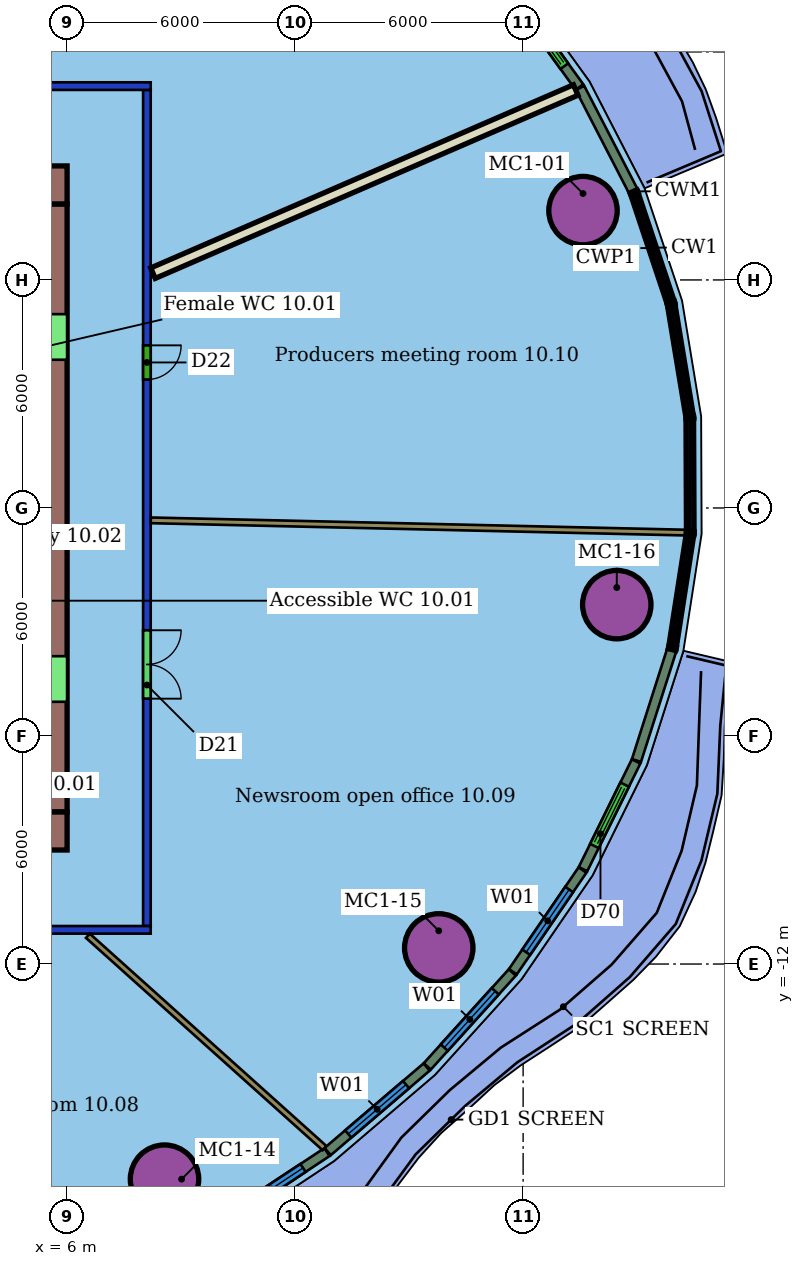
"""IFC4 building model, lengths in metres.
Left out: names, types, materials, properties, quantities, classifications, styles, units other than length and angle.
Written with IfcOpenShell. Run it as: python <this file> out.ifc"""

import sys

from ifc_helpers import new_model, si_unit, direction, frame, frame_2d, origin, origin_2d, place, context, subcontext, project, spatial, rectangle, hollow_circle, extrude, element, fill, save


model = new_model("IFC4")
c1 = context("Model", 3, precision=1e-05, world=origin(), true_north=direction((0.0, 1.0)))
c2 = subcontext(c1, "Body", "Model", "MODEL_VIEW")
j1 = project(units=[si_unit("LENGTHUNIT", "METRE"), si_unit("PLANEANGLEUNIT", "RADIAN")], contexts=[c1])
p1 = place(None, origin())
s1 = spatial("IfcSite", under=j1, at=p1, CompositionType="ELEMENT")
p2 = place(p1, origin())
s2 = spatial("IfcBuilding", under=s1, at=p2, CompositionType="ELEMENT")
p3 = place(p2, frame((0.0, 0.0, 54.5)))
s3 = spatial("IfcBuildingStorey", under=s2, at=p3, CompositionType="ELEMENT", Elevation=54.5)
for number, where, z_axis, x_axis in (
    (1, (19.575, 7.824, 0.0), (0.0, 0.0, 1.0), (1.0, 0.0, 0.0)),
    (2, (8.563, -17.66, 0.0), (0.0, 0.0, 1.0), (1.0, 0.0, 0.0)),
    (3, (15.78, -11.576, 0.0), (0.0, 0.0, 1.0), (1.0, 0.0, 0.0)),
    (4, (20.464, -2.543, 0.0), (0.0, 0.0, 1.0), (1.0, 0.0, 0.0)),
):
    element("IfcColumn", number, at=place(p3, frame(where, z_axis=z_axis, x_axis=x_axis)), inside=s3, PredefinedType="COLUMN", context=c2, shape_type="SweptSolid", body=[
        extrude(hollow_circle(Radius=0.9, WallThickness=0.06, at=origin_2d()), origin(), (0.0, 0.0, 1.0), 3.55),
    ])
p4 = place(p3, frame((8.2, -11.1, 0.0), z_axis=(0.0, 0.0, 1.0), x_axis=(-1.0, 0.0, 0.0)))
e5 = element("IfcWall", 5, at=p4, inside=s3, PredefinedType="PARTITIONING", context=c2, shape_type="SweptSolid", body=[
    extrude(rectangle(XDim=28.4, YDim=0.2, at=frame_2d((14.2, 0.0))), origin(), (0.0, 0.0, 1.0), 2.85),
])
p5 = place(p4, frame((24.567, 0.0, 0.0)))
e6 = element("IfcOpeningElement", 6, at=p5, cuts=e5, PredefinedType="OPENING", context=c2, shape_type="SweptSolid", body=[
    extrude(rectangle(XDim=1.1, YDim=2.1, at=frame_2d((0.55, 1.05))), frame((0.0, 0.11, 0.0), z_axis=(0.0, -1.0, 0.0), x_axis=(1.0, 0.0, 0.0)), (0.0, 0.0, 1.0), 0.22),
])
p6 = place(p4, frame((13.203, 0.0, 0.0)))
e7 = element("IfcOpeningElement", 7, at=p6, cuts=e5, PredefinedType="OPENING", context=c2, shape_type="SweptSolid", body=[
    extrude(rectangle(XDim=1.8, YDim=2.1, at=frame_2d((0.9, 1.05))), frame((0.0, 0.11, 0.0), z_axis=(0.0, -1.0, 0.0), x_axis=(1.0, 0.0, 0.0)), (0.0, 0.0, 1.0), 0.22),
])
p7 = place(p4, frame((6.325, 0.0, 0.0)))
e8 = element("IfcOpeningElement", 8, at=p7, cuts=e5, PredefinedType="OPENING", context=c2, shape_type="SweptSolid", body=[
    extrude(rectangle(XDim=0.9, YDim=2.1, at=frame_2d((0.45, 1.05))), frame((0.0, 0.11, 0.0), z_axis=(0.0, -1.0, 0.0), x_axis=(1.0, 0.0, 0.0)), (0.0, 0.0, 1.0), 0.22),
])
p8 = place(p3, frame((-20.2, 11.1, 0.0), z_axis=(0.0, 0.0, 1.0), x_axis=(1.0, 0.0, 0.0)))
e9 = element("IfcWall", 9, at=p8, inside=s3, PredefinedType="PARTITIONING", context=c2, shape_type="SweptSolid", body=[
    extrude(rectangle(XDim=28.4, YDim=0.2, at=frame_2d((14.2, 0.0))), origin(), (0.0, 0.0, 1.0), 2.85),
])
p9 = place(p8, frame((24.567, 0.0, 0.0)))
e10 = element("IfcOpeningElement", 10, at=p9, cuts=e9, PredefinedType="OPENING", context=c2, shape_type="SweptSolid", body=[
    extrude(rectangle(XDim=1.1, YDim=2.1, at=frame_2d((0.55, 1.05))), frame((0.0, 0.11, 0.0), z_axis=(0.0, -1.0, 0.0), x_axis=(1.0, 0.0, 0.0)), (0.0, 0.0, 1.0), 0.22),
])
p10 = place(p8, frame((19.115, 0.0, 0.0)))
e11 = element("IfcOpeningElement", 11, at=p10, cuts=e9, PredefinedType="OPENING", context=c2, shape_type="SweptSolid", body=[
    extrude(rectangle(XDim=1.2, YDim=2.1, at=frame_2d((0.6, 1.05))), frame((0.0, 0.11, 0.0), z_axis=(0.0, -1.0, 0.0), x_axis=(1.0, 0.0, 0.0)), (0.0, 0.0, 1.0), 0.22),
])
p11 = place(p8, frame((10.338, 0.0, 0.0)))
e12 = element("IfcOpeningElement", 12, at=p11, cuts=e9, PredefinedType="OPENING", context=c2, shape_type="SweptSolid", body=[
    extrude(rectangle(XDim=1.5, YDim=2.1, at=frame_2d((0.75, 1.05))), frame((0.0, 0.11, 0.0), z_axis=(0.0, -1.0, 0.0), x_axis=(1.0, 0.0, 0.0)), (0.0, 0.0, 1.0), 0.22),
])
p12 = place(p8, frame((5.64, 0.0, 0.0)))
e13 = element("IfcOpeningElement", 13, at=p12, cuts=e9, PredefinedType="OPENING", context=c2, shape_type="SweptSolid", body=[
    extrude(rectangle(XDim=1.1, YDim=2.1, at=frame_2d((0.55, 1.05))), frame((0.0, 0.11, 0.0), z_axis=(0.0, -1.0, 0.0), x_axis=(1.0, 0.0, 0.0)), (0.0, 0.0, 1.0), 0.22),
])
p13 = place(p3, frame((8.1, 11.0, 0.0), z_axis=(0.0, 0.0, 1.0), x_axis=(0.0, -1.0, 0.0)))
e14 = element("IfcWall", 14, at=p13, inside=s3, PredefinedType="PARTITIONING", context=c2, shape_type="SweptSolid", body=[
    extrude(rectangle(XDim=22.0, YDim=0.2, at=frame_2d((11.0, 0.0))), origin(), (0.0, 0.0, 1.0), 2.85),
])
p14 = place(p13, frame((14.218, 0.0, 0.0)))
e15 = element("IfcOpeningElement", 15, at=p14, cuts=e14, PredefinedType="OPENING", context=c2, shape_type="SweptSolid", body=[
    extrude(rectangle(XDim=1.8, YDim=2.1, at=frame_2d((0.9, 1.05))), frame((0.0, 0.11, 0.0), z_axis=(0.0, -1.0, 0.0), x_axis=(1.0, 0.0, 0.0)), (0.0, 0.0, 1.0), 0.22),
])
p15 = place(p13, frame((6.721, 0.0, 0.0)))
e16 = element("IfcOpeningElement", 16, at=p15, cuts=e14, PredefinedType="OPENING", context=c2, shape_type="SweptSolid", body=[
    extrude(rectangle(XDim=0.9, YDim=2.1, at=frame_2d((0.45, 1.05))), frame((0.0, 0.11, 0.0), z_axis=(0.0, -1.0, 0.0), x_axis=(1.0, 0.0, 0.0)), (0.0, 0.0, 1.0), 0.22),
])
p16 = place(p3, frame((19.384, 10.998, 0.0), z_axis=(0.0, 0.0, 1.0), x_axis=(-0.917576439965, -0.397559400368, 0.0)))
e17 = element("IfcWall", 17, at=p16, inside=s3, PredefinedType="PARTITIONING", context=c2, shape_type="SweptSolid", body=[
    extrude(rectangle(XDim=12.124, YDim=0.3, at=frame_2d((6.062, 0.0))), origin(), (0.0, 0.0, 1.0), 3.55),
])
p17 = place(p3, frame((9.701, 19.737, 0.0), z_axis=(0.0, 0.0, 1.0), x_axis=(-0.622554117307, -0.782576750884, 0.0)))
e18 = element("IfcWall", 18, at=p17, inside=s3, PredefinedType="PARTITIONING", context=c2, shape_type="SweptSolid", body=[
    extrude(rectangle(XDim=10.79, YDim=0.3, at=frame_2d((5.395, 0.0))), origin(), (0.0, 0.0, 1.0), 3.55),
])
p18 = place(p3, frame((12.772, -16.842, 0.0), z_axis=(0.0, 0.0, 1.0), x_axis=(-0.744332297439, 0.667809427149, 0.0)))
e19 = element("IfcWall", 19, at=p18, inside=s3, PredefinedType="PARTITIONING", context=c2, shape_type="SweptSolid", body=[
    extrude(rectangle(XDim=8.365, YDim=0.15, at=frame_2d((4.183, 0.0))), origin(), (0.0, 0.0, 1.0), 3.55),
])
p19 = place(p3, frame((22.273, -0.648, 0.0), z_axis=(0.0, 0.0, 1.0), x_axis=(-0.999737447045, 0.022913685328, 0.0)))
e20 = element("IfcWall", 20, at=p19, inside=s3, PredefinedType="PARTITIONING", context=c2, shape_type="SweptSolid", body=[
    extrude(rectangle(XDim=14.075, YDim=0.15, at=frame_2d((7.038, 0.0))), origin(), (0.0, 0.0, 1.0), 3.55),
])
p20 = place(p3, frame((20.895, 8.342, 0.0), z_axis=(0.0, 0.0, 1.0), x_axis=(-0.458675555217, 0.888603812194, 0.0)))
e21 = element("IfcWall", 21, at=p20, inside=s3, PredefinedType="SOLIDWALL", context=c2, shape_type="SweptSolid", body=[
    extrude(rectangle(XDim=3.049, YDim=0.25, at=frame_2d((1.524, 0.0))), origin(), (0.0, 0.0, 1.0), 3.15),
])
p21 = place(p3, frame((19.482, 11.074, 0.0), z_axis=(0.0, 0.0, 1.0), x_axis=(-0.585513121853, 0.810662928805, 0.0)))
e22 = element("IfcWall", 22, at=p21, inside=s3, PredefinedType="SOLIDWALL", context=c2, shape_type="SweptSolid", body=[
    extrude(rectangle(XDim=3.16, YDim=0.25, at=frame_2d((1.58, 0.0))), origin(), (0.0, 0.0, 1.0), 3.15),
])
p22 = place(p21, frame((0.68, 0.0, 0.0)))
e23 = element("IfcOpeningElement", 23, at=p22, cuts=e22, PredefinedType="OPENING", context=c2, shape_type="SweptSolid", body=[
    extrude(rectangle(XDim=1.8, YDim=2.4, at=frame_2d((0.9, 1.2))), frame((0.0, 0.135, 0.0), z_axis=(0.0, -1.0, 0.0), x_axis=(1.0, 0.0, 0.0)), (0.0, 0.0, 1.0), 0.27),
])
p23 = place(p3, frame((9.911, -18.886, 0.0), z_axis=(0.0, 0.0, 1.0), x_axis=(0.833854064254, 0.551984963135, 0.0)))
e24 = element("IfcWall", 24, at=p23, inside=s3, PredefinedType="SOLIDWALL", context=c2, shape_type="SweptSolid", body=[
    extrude(rectangle(XDim=3.51, YDim=0.25, at=frame_2d((1.755, 0.0))), origin(), (0.0, 0.0, 1.0), 3.15),
])
p24 = place(p23, frame((0.755, 0.0, 0.8)))
e25 = element("IfcOpeningElement", 25, at=p24, cuts=e24, PredefinedType="OPENING", context=c2, shape_type="SweptSolid", body=[
    extrude(rectangle(XDim=2.0, YDim=2.2, at=frame_2d((1.0, 1.1))), frame((0.0, 0.135, 0.0), z_axis=(0.0, -1.0, 0.0), x_axis=(1.0, 0.0, 0.0)), (0.0, 0.0, 1.0), 0.27),
])
p25 = place(p3, frame((12.856, -16.935, 0.0), z_axis=(0.0, 0.0, 1.0), x_axis=(0.760387612855, 0.649469536019, 0.0)))
e26 = element("IfcWall", 26, at=p25, inside=s3, PredefinedType="SOLIDWALL", context=c2, shape_type="SweptSolid", body=[
    extrude(rectangle(XDim=3.425, YDim=0.25, at=frame_2d((1.712, 0.0))), origin(), (0.0, 0.0, 1.0), 3.15),
])
p26 = place(p25, frame((0.712, 0.0, 0.8)))
e27 = element("IfcOpeningElement", 27, at=p26, cuts=e26, PredefinedType="OPENING", context=c2, shape_type="SweptSolid", body=[
    extrude(rectangle(XDim=2.0, YDim=2.2, at=frame_2d((1.0, 1.1))), frame((0.0, 0.135, 0.0), z_axis=(0.0, -1.0, 0.0), x_axis=(1.0, 0.0, 0.0)), (0.0, 0.0, 1.0), 0.27),
])
p27 = place(p3, frame((15.478, -14.693, 0.0), z_axis=(0.0, 0.0, 1.0), x_axis=(0.670965097122, 0.74148893346, 0.0)))
e28 = element("IfcWall", 28, at=p27, inside=s3, PredefinedType="SOLIDWALL", context=c2, shape_type="SweptSolid", body=[
    extrude(rectangle(XDim=3.334, YDim=0.25, at=frame_2d((1.667, 0.0))), origin(), (0.0, 0.0, 1.0), 3.15),
])
p28 = place(p27, frame((0.667, 0.0, 0.8)))
e29 = element("IfcOpeningElement", 29, at=p28, cuts=e28, PredefinedType="OPENING", context=c2, shape_type="SweptSolid", body=[
    extrude(rectangle(XDim=2.0, YDim=2.2, at=frame_2d((1.0, 1.1))), frame((0.0, 0.135, 0.0), z_axis=(0.0, -1.0, 0.0), x_axis=(1.0, 0.0, 0.0)), (0.0, 0.0, 1.0), 0.27),
])
p29 = place(p3, frame((17.73, -12.202, 0.0), z_axis=(0.0, 0.0, 1.0), x_axis=(0.564924055241, 0.825142903872, 0.0)))
e30 = element("IfcWall", 30, at=p29, inside=s3, PredefinedType="SOLIDWALL", context=c2, shape_type="SweptSolid", body=[
    extrude(rectangle(XDim=3.243, YDim=0.25, at=frame_2d((1.622, 0.0))), origin(), (0.0, 0.0, 1.0), 3.15),
])
p30 = place(p29, frame((0.622, 0.0, 0.8)))
e31 = element("IfcOpeningElement", 31, at=p30, cuts=e30, PredefinedType="OPENING", context=c2, shape_type="SweptSolid", body=[
    extrude(rectangle(XDim=2.0, YDim=2.2, at=frame_2d((1.0, 1.1))), frame((0.0, 0.135, 0.0), z_axis=(0.0, -1.0, 0.0), x_axis=(1.0, 0.0, 0.0)), (0.0, 0.0, 1.0), 0.27),
])
p31 = place(p3, frame((19.575, -9.503, 0.0), z_axis=(0.0, 0.0, 1.0), x_axis=(0.442106876823, 0.896962379069, 0.0)))
e32 = element("IfcWall", 32, at=p31, inside=s3, PredefinedType="SOLIDWALL", context=c2, shape_type="SweptSolid", body=[
    extrude(rectangle(XDim=3.16, YDim=0.25, at=frame_2d((1.58, 0.0))), origin(), (0.0, 0.0, 1.0), 3.15),
])
p32 = place(p31, frame((0.68, 0.0, 0.0)))
e33 = element("IfcOpeningElement", 33, at=p32, cuts=e32, PredefinedType="OPENING", context=c2, shape_type="SweptSolid", body=[
    extrude(rectangle(XDim=1.8, YDim=2.4, at=frame_2d((0.9, 1.2))), frame((0.0, 0.135, 0.0), z_axis=(0.0, -1.0, 0.0), x_axis=(1.0, 0.0, 0.0)), (0.0, 0.0, 1.0), 0.27),
])
p33 = place(p3, frame((20.982, -6.645, 0.0), z_axis=(0.0, 0.0, 1.0), x_axis=(0.304092753462, 0.952642428874, 0.0)))
e34 = element("IfcWall", 34, at=p33, inside=s3, PredefinedType="SOLIDWALL", context=c2, shape_type="SweptSolid", body=[
    extrude(rectangle(XDim=3.048, YDim=0.25, at=frame_2d((1.524, 0.0))), origin(), (0.0, 0.0, 1.0), 3.15),
])
p34 = place(p3, frame((6.0, 8.5, 0.0), z_axis=(0.0, 0.0, 1.0), x_axis=(-1.0, 0.0, 0.0)))
e35 = element("IfcWall", 35, at=p34, inside=s3, PredefinedType="SHEAR", context=c2, shape_type="SweptSolid", body=[
    extrude(rectangle(XDim=12.0, YDim=1.0, at=frame_2d((6.0, 0.0))), origin(), (0.0, 0.0, 1.0), 3.4),
])
p35 = place(p34, frame((5.6, 0.0, 0.0)))
e36 = element("IfcOpeningElement", 36, at=p35, cuts=e35, PredefinedType="OPENING", context=c2, shape_type="SweptSolid", body=[
    extrude(rectangle(XDim=1.2, YDim=2.1, at=frame_2d((0.6, 1.05))), frame((0.0, 0.51, 0.0), z_axis=(0.0, -1.0, 0.0), x_axis=(1.0, 0.0, 0.0)), (0.0, 0.0, 1.0), 1.02),
])
p36 = place(p3, frame((-18.0, -8.5, 0.0), z_axis=(0.0, 0.0, 1.0), x_axis=(1.0, 0.0, 0.0)))
e37 = element("IfcWall", 37, at=p36, inside=s3, PredefinedType="SHEAR", context=c2, shape_type="SweptSolid", body=[
    extrude(rectangle(XDim=24.0, YDim=1.0, at=frame_2d((12.0, 0.0))), origin(), (0.0, 0.0, 1.0), 3.4),
])
p37 = place(p36, frame((6.0, 0.0, 0.0)))
e38 = element("IfcOpeningElement", 38, at=p37, cuts=e37, PredefinedType="OPENING", context=c2, shape_type="SweptSolid", body=[
    extrude(rectangle(XDim=1.2, YDim=2.1, at=frame_2d((0.6, 1.05))), frame((0.0, 0.51, 0.0), z_axis=(0.0, -1.0, 0.0), x_axis=(1.0, 0.0, 0.0)), (0.0, 0.0, 1.0), 1.02),
])
p38 = place(p3, frame((5.5, -8.0, 0.0), z_axis=(0.0, 0.0, 1.0), x_axis=(0.0, 1.0, 0.0)))
e39 = element("IfcWall", 39, at=p38, inside=s3, PredefinedType="SHEAR", context=c2, shape_type="SweptSolid", body=[
    extrude(rectangle(XDim=16.0, YDim=1.0, at=frame_2d((8.0, 0.0))), origin(), (0.0, 0.0, 1.0), 3.4),
])
p39 = place(p38, frame((2.9, 0.0, 0.0)))
e40 = element("IfcOpeningElement", 40, at=p39, cuts=e39, PredefinedType="OPENING", context=c2, shape_type="SweptSolid", body=[
    extrude(rectangle(XDim=1.2, YDim=2.1, at=frame_2d((0.6, 1.05))), frame((0.0, 0.51, 0.0), z_axis=(0.0, -1.0, 0.0), x_axis=(1.0, 0.0, 0.0)), (0.0, 0.0, 1.0), 1.02),
])
p40 = place(p38, frame((11.9, 0.0, 0.0)))
e41 = element("IfcOpeningElement", 41, at=p40, cuts=e39, PredefinedType="OPENING", context=c2, shape_type="SweptSolid", body=[
    extrude(rectangle(XDim=1.2, YDim=2.1, at=frame_2d((0.6, 1.05))), frame((0.0, 0.51, 0.0), z_axis=(0.0, -1.0, 0.0), x_axis=(1.0, 0.0, 0.0)), (0.0, 0.0, 1.0), 1.02),
])
p41 = place(p14, origin())
e42 = element("IfcDoor", 42, at=p41, inside=s3, OperationType="DOUBLE_DOOR_SINGLE_SWING", PredefinedType="DOOR", context=c2, shape_type="SweptSolid", body=[
    extrude(rectangle(XDim=1.8, YDim=2.1, at=frame_2d((0.9, 1.05))), frame((0.0, 0.025, 0.0), z_axis=(0.0, -1.0, 0.0), x_axis=(1.0, 0.0, 0.0)), (0.0, 0.0, 1.0), 0.05),
])
fill(e15, e42)
p42 = place(p15, origin())
e43 = element("IfcDoor", 43, at=p42, inside=s3, OperationType="SINGLE_SWING_LEFT", PredefinedType="DOOR", context=c2, shape_type="SweptSolid", body=[
    extrude(rectangle(XDim=0.9, YDim=2.1, at=frame_2d((0.45, 1.05))), frame((0.0, 0.025, 0.0), z_axis=(0.0, -1.0, 0.0), x_axis=(1.0, 0.0, 0.0)), (0.0, 0.0, 1.0), 0.05),
])
fill(e16, e43)
p43 = place(p22, origin())
e44 = element("IfcDoor", 44, at=p43, inside=s3, OperationType="DOUBLE_DOOR_SLIDING", PredefinedType="DOOR", context=c2, shape_type="SweptSolid", body=[
    extrude(rectangle(XDim=1.8, YDim=2.4, at=frame_2d((0.9, 1.2))), frame((0.0, 0.025, 0.0), z_axis=(0.0, -1.0, 0.0), x_axis=(1.0, 0.0, 0.0)), (0.0, 0.0, 1.0), 0.05),
])
fill(e23, e44)
p44 = place(p24, origin())
e45 = element("IfcWindow", 45, at=p44, inside=s3, PartitioningType="SINGLE_PANEL", PredefinedType="WINDOW", context=c2, shape_type="SweptSolid", body=[
    extrude(rectangle(XDim=2.0, YDim=2.2, at=frame_2d((1.0, 1.1))), frame((0.0, 0.03, 0.0), z_axis=(0.0, -1.0, 0.0), x_axis=(1.0, 0.0, 0.0)), (0.0, 0.0, 1.0), 0.06),
])
fill(e25, e45)
p45 = place(p26, origin())
e46 = element("IfcWindow", 46, at=p45, inside=s3, PartitioningType="SINGLE_PANEL", PredefinedType="WINDOW", context=c2, shape_type="SweptSolid", body=[
    extrude(rectangle(XDim=2.0, YDim=2.2, at=frame_2d((1.0, 1.1))), frame((0.0, 0.03, 0.0), z_axis=(0.0, -1.0, 0.0), x_axis=(1.0, 0.0, 0.0)), (0.0, 0.0, 1.0), 0.06),
])
fill(e27, e46)
p46 = place(p28, origin())
e47 = element("IfcWindow", 47, at=p46, inside=s3, PartitioningType="SINGLE_PANEL", PredefinedType="WINDOW", context=c2, shape_type="SweptSolid", body=[
    extrude(rectangle(XDim=2.0, YDim=2.2, at=frame_2d((1.0, 1.1))), frame((0.0, 0.03, 0.0), z_axis=(0.0, -1.0, 0.0), x_axis=(1.0, 0.0, 0.0)), (0.0, 0.0, 1.0), 0.06),
])
fill(e29, e47)
p47 = place(p30, origin())
e48 = element("IfcWindow", 48, at=p47, inside=s3, PartitioningType="SINGLE_PANEL", PredefinedType="WINDOW", context=c2, shape_type="SweptSolid", body=[
    extrude(rectangle(XDim=2.0, YDim=2.2, at=frame_2d((1.0, 1.1))), frame((0.0, 0.03, 0.0), z_axis=(0.0, -1.0, 0.0), x_axis=(1.0, 0.0, 0.0)), (0.0, 0.0, 1.0), 0.06),
])
fill(e31, e48)
p48 = place(p32, origin())
e49 = element("IfcDoor", 49, at=p48, inside=s3, OperationType="DOUBLE_DOOR_SLIDING", PredefinedType="DOOR", context=c2, shape_type="SweptSolid", body=[
    extrude(rectangle(XDim=1.8, YDim=2.4, at=frame_2d((0.9, 1.2))), frame((0.0, 0.025, 0.0), z_axis=(0.0, -1.0, 0.0), x_axis=(1.0, 0.0, 0.0)), (0.0, 0.0, 1.0), 0.05),
])
fill(e33, e49)
save(model, sys.argv[1])
